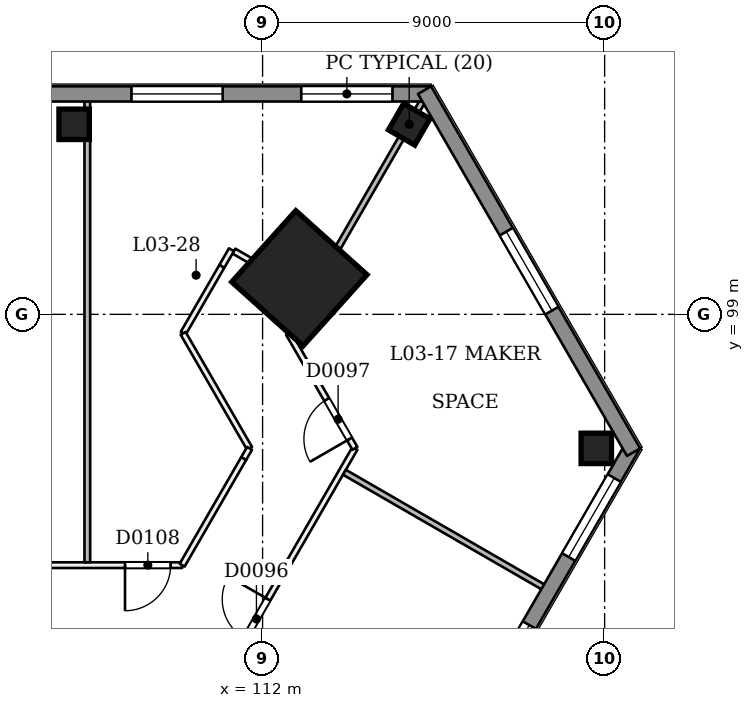
"""IFC4 building model, lengths in metres.
Left out: names, types, materials, properties, quantities, classifications, styles, units other than length and angle.
Written with IfcOpenShell. Run it as: python <this file> out.ifc"""

import sys

from ifc_helpers import new_model, si_unit, direction, frame, frame_2d, origin, origin_2d, place, context, subcontext, project, spatial, rectangle, extrude, element, fill, save


model = new_model("IFC4")
c1 = context("Model", 3, precision=1e-05, world=origin(), true_north=direction((0.0, 1.0)))
c2 = subcontext(c1, "Body", "Model", "MODEL_VIEW")
j1 = project(units=[si_unit("LENGTHUNIT", "METRE"), si_unit("PLANEANGLEUNIT", "RADIAN")], contexts=[c1])
p1 = place(None, origin())
s1 = spatial("IfcSite", under=j1, at=p1, CompositionType="ELEMENT")
p2 = place(p1, origin())
s2 = spatial("IfcBuilding", under=s1, at=p2, CompositionType="ELEMENT")
p3 = place(p2, frame((0.0, 0.0, 18.0)))
s3 = spatial("IfcBuildingStorey", under=s2, at=p3, CompositionType="ELEMENT", Elevation=18.0)
p4 = place(p3, frame((113.003, 99.937, 0.0), z_axis=(-0.028416116488, 0.009273198319, 0.999553166228), x_axis=(0.499378169788, -0.866098833474, 0.022231828423)))
e1 = element("IfcColumn", 1, at=p4, inside=s3, PredefinedType="COLUMN", context=c2, shape_type="SweptSolid", body=[
    extrude(rectangle(XDim=2.52, YDim=2.52, at=origin_2d()), origin(), (0.0, 0.0, 1.0), 4.502),
])
for number, where, z_axis, x_axis in (
    (2, (115.858, 104.0, 0.0), (0.0, 0.0, 1.0), (0.5, 0.866, 0.0)),
    (3, (107.041, 104.0, 0.0), (0.0, 0.0, 1.0), (1.0, 0.0, 0.0)),
    (4, (120.781, 95.474, 0.0), (0.0, 0.0, 1.0), (1.745e-08, 1.0, 0.0)),
):
    element("IfcColumn", number, at=place(p3, frame(where, z_axis=z_axis, x_axis=x_axis)), inside=s3, PredefinedType="COLUMN", context=c2, shape_type="SweptSolid", body=[
        extrude(rectangle(XDim=0.8, YDim=0.8, at=origin_2d()), origin(), (0.0, 0.0, 1.0), 4.5),
    ])
p5 = place(p3, frame((86.747, 47.526, 0.0), z_axis=(0.0, 0.0, 1.0), x_axis=(0.500000085768, 0.866025354266, 0.0)))
e5 = element("IfcWall", 5, at=p5, inside=s3, PredefinedType="PARTITIONING", context=c2, shape_type="SweptSolid", body=[
    extrude(rectangle(XDim=55.365, YDim=0.15, at=frame_2d((27.682, 0.0))), origin(), (0.0, 0.0, 1.0), 3.55),
])
p6 = place(p5, frame((0.97, 0.0, 0.0)))
e6 = element("IfcOpeningElement", 6, at=p6, cuts=e5, PredefinedType="OPENING", context=c2, shape_type="SweptSolid", body=[
    extrude(rectangle(XDim=1.2, YDim=2.1, at=frame_2d((0.6, 1.05))), frame((0.0, 0.085, 0.0), z_axis=(0.0, -1.0, 0.0), x_axis=(1.0, 0.0, 0.0)), (0.0, 0.0, 1.0), 0.171),
])
p7 = place(p5, frame((11.332, 0.0, 0.0)))
e7 = element("IfcOpeningElement", 7, at=p7, cuts=e5, PredefinedType="OPENING", context=c2, shape_type="SweptSolid", body=[
    extrude(rectangle(XDim=1.2, YDim=2.1, at=frame_2d((0.6, 1.05))), frame((0.0, 0.085, 0.0), z_axis=(0.0, -1.0, 0.0), x_axis=(1.0, 0.0, 0.0)), (0.0, 0.0, 1.0), 0.171),
])
p8 = place(p5, frame((22.582, 0.0, 0.0)))
e8 = element("IfcOpeningElement", 8, at=p8, cuts=e5, PredefinedType="OPENING", context=c2, shape_type="SweptSolid", body=[
    extrude(rectangle(XDim=1.2, YDim=2.1, at=frame_2d((0.6, 1.05))), frame((0.0, 0.085, 0.0), z_axis=(0.0, -1.0, 0.0), x_axis=(1.0, 0.0, 0.0)), (0.0, 0.0, 1.0), 0.171),
])
p9 = place(p5, frame((28.365, 0.0, 0.0)))
e9 = element("IfcOpeningElement", 9, at=p9, cuts=e5, PredefinedType="OPENING", context=c2, shape_type="SweptSolid", body=[
    extrude(rectangle(XDim=1.0, YDim=2.1, at=frame_2d((0.5, 1.05))), frame((0.0, 0.085, 0.0), z_axis=(0.0, -1.0, 0.0), x_axis=(1.0, 0.0, 0.0)), (0.0, 0.0, 1.0), 0.171),
])
p10 = place(p5, frame((30.615, 0.0, 0.0)))
e10 = element("IfcOpeningElement", 10, at=p10, cuts=e5, PredefinedType="OPENING", context=c2, shape_type="SweptSolid", body=[
    extrude(rectangle(XDim=1.0, YDim=2.1, at=frame_2d((0.5, 1.05))), frame((0.0, 0.085, 0.0), z_axis=(0.0, -1.0, 0.0), x_axis=(1.0, 0.0, 0.0)), (0.0, 0.0, 1.0), 0.171),
])
p11 = place(p5, frame((38.332, 0.0, 0.0)))
e11 = element("IfcOpeningElement", 11, at=p11, cuts=e5, PredefinedType="OPENING", context=c2, shape_type="SweptSolid", body=[
    extrude(rectangle(XDim=1.2, YDim=2.1, at=frame_2d((0.6, 1.05))), frame((0.0, 0.085, 0.0), z_axis=(0.0, -1.0, 0.0), x_axis=(1.0, 0.0, 0.0)), (0.0, 0.0, 1.0), 0.171),
])
p12 = place(p5, frame((49.582, 0.0, 0.0)))
e12 = element("IfcOpeningElement", 12, at=p12, cuts=e5, PredefinedType="OPENING", context=c2, shape_type="SweptSolid", body=[
    extrude(rectangle(XDim=1.2, YDim=2.1, at=frame_2d((0.6, 1.05))), frame((0.0, 0.085, 0.0), z_axis=(0.0, -1.0, 0.0), x_axis=(1.0, 0.0, 0.0)), (0.0, 0.0, 1.0), 0.171),
])
p13 = place(p3, frame((114.43, 95.474, 0.0), z_axis=(0.0, 0.0, 1.0), x_axis=(-0.500008701212, 0.866020380079, 0.0)))
e13 = element("IfcWall", 13, at=p13, inside=s3, PredefinedType="PARTITIONING", context=c2, shape_type="SweptSolid", body=[
    extrude(rectangle(XDim=3.495, YDim=0.15, at=frame_2d((1.747, 0.0))), origin(), (0.0, 0.0, 1.0), 3.55),
])
p14 = place(p13, frame((0.285, 0.0, 0.0)))
e14 = element("IfcOpeningElement", 14, at=p14, cuts=e13, PredefinedType="OPENING", context=c2, shape_type="SweptSolid", body=[
    extrude(rectangle(XDim=1.2, YDim=2.1, at=frame_2d((0.6, 1.05))), frame((0.0, 0.085, 0.0), z_axis=(0.0, -1.0, 0.0), x_axis=(1.0, 0.0, 0.0)), (0.0, 0.0, 1.0), 0.171),
])
p15 = place(p3, frame((112.682, 98.5, 0.0), z_axis=(0.0, 0.0, 1.0), x_axis=(0.500172206961, 0.865925957218, 0.0)))
e15 = element("IfcWall", 15, at=p15, inside=s3, PredefinedType="PARTITIONING", context=c2, shape_type="SweptSolid", body=[
    extrude(rectangle(XDim=1.081, YDim=0.15, at=frame_2d((0.54, 0.0))), origin(), (0.0, 0.0, 1.0), 3.55),
])
p16 = place(p3, frame((109.883, 92.401, 0.0), z_axis=(0.0, 0.0, 1.0), x_axis=(-1.0, 0.0, 0.0)))
e16 = element("IfcWall", 16, at=p16, inside=s3, PredefinedType="PARTITIONING", context=c2, shape_type="SweptSolid", body=[
    extrude(rectangle(XDim=10.082, YDim=0.15, at=frame_2d((5.041, 0.0))), origin(), (0.0, 0.0, 1.0), 4.05),
])
p17 = place(p16, frame((5.987, 0.0, 0.0)))
e17 = element("IfcOpeningElement", 17, at=p17, cuts=e16, PredefinedType="OPENING", context=c2, shape_type="SweptSolid", body=[
    extrude(rectangle(XDim=1.2, YDim=2.1, at=frame_2d((0.6, 1.05))), frame((0.0, 0.085, 0.0), z_axis=(0.0, -1.0, 0.0), x_axis=(1.0, 0.0, 0.0)), (0.0, 0.0, 1.0), 0.171),
])
p18 = place(p16, frame((0.303, 0.0, 0.0)))
e18 = element("IfcOpeningElement", 18, at=p18, cuts=e16, PredefinedType="OPENING", context=c2, shape_type="SweptSolid", body=[
    extrude(rectangle(XDim=1.2, YDim=2.1, at=frame_2d((0.6, 1.05))), frame((0.0, 0.085, 0.0), z_axis=(0.0, -1.0, 0.0), x_axis=(1.0, 0.0, 0.0)), (0.0, 0.0, 1.0), 0.171),
])
p19 = place(p3, frame((113.195, 99.538, 0.0), z_axis=(0.0, 0.0, 1.0), x_axis=(-0.866200031611, 0.499697413678, 0.0)))
e19 = element("IfcWall", 19, at=p19, inside=s3, PredefinedType="PARTITIONING", context=c2, shape_type="SweptSolid", body=[
    extrude(rectangle(XDim=2.251, YDim=0.15, at=frame_2d((1.125, 0.0))), origin(), (0.0, 0.0, 1.0), 3.55),
])
p20 = place(p3, frame((111.181, 100.701, 0.0), z_axis=(0.0, 0.0, 1.0), x_axis=(-0.499972622635, -0.866041209536, 0.0)))
e20 = element("IfcWall", 20, at=p20, inside=s3, PredefinedType="PARTITIONING", context=c2, shape_type="SweptSolid", body=[
    extrude(rectangle(XDim=0.507, YDim=0.15, at=frame_2d((0.253, 0.0))), origin(), (0.0, 0.0, 1.0), 3.55),
])
p21 = place(p3, frame((110.927, 100.262, 0.0), z_axis=(0.0, 0.0, 1.0), x_axis=(-0.499985639223, -0.866033694824, 0.0)))
e21 = element("IfcWall", 21, at=p21, inside=s3, PredefinedType="PARTITIONING", context=c2, shape_type="SweptSolid", body=[
    extrude(rectangle(XDim=2.034, YDim=0.15, at=frame_2d((1.017, 0.0))), origin(), (0.0, 0.0, 1.0), 4.05),
])
p22 = place(p3, frame((109.91, 98.5, 0.0), z_axis=(0.0, 0.0, 1.0), x_axis=(0.499956301907, -0.86605063142, 0.0)))
e22 = element("IfcWall", 22, at=p22, inside=s3, PredefinedType="PARTITIONING", context=c2, shape_type="SweptSolid", body=[
    extrude(rectangle(XDim=3.494, YDim=0.15, at=frame_2d((1.747, 0.0))), origin(), (0.0, 0.0, 1.0), 3.55),
])
p23 = place(p3, frame((111.657, 95.474, 0.0), z_axis=(0.0, 0.0, 1.0), x_axis=(-0.500016430238, -0.866015917575, 0.0)))
e23 = element("IfcWall", 23, at=p23, inside=s3, PredefinedType="PARTITIONING", context=c2, shape_type="SweptSolid", body=[
    extrude(rectangle(XDim=0.312, YDim=0.15, at=frame_2d((0.156, 0.0))), origin(), (0.0, 0.0, 1.0), 3.55),
])
p24 = place(p3, frame((111.501, 95.204, 0.0), z_axis=(0.0, 0.0, 1.0), x_axis=(-0.499968406128, -0.866043643747, 0.0)))
e24 = element("IfcWall", 24, at=p24, inside=s3, PredefinedType="PARTITIONING", context=c2, shape_type="SweptSolid", body=[
    extrude(rectangle(XDim=3.237, YDim=0.15, at=frame_2d((1.618, 0.0))), origin(), (0.0, 0.0, 1.0), 4.05),
])
p25 = place(p3, frame((119.631, 91.683, 0.0), z_axis=(0.0, 0.0, 1.0), x_axis=(-0.866025537322, 0.499999768706, 0.0)))
e25 = element("IfcWall", 25, at=p25, inside=s3, PredefinedType="PARTITIONING", context=c2, shape_type="SweptSolid", body=[
    extrude(rectangle(XDim=6.325, YDim=0.15, at=frame_2d((3.163, 0.0))), origin(), (0.0, 0.0, 1.0), 4.05),
])
p26 = place(p3, frame((116.377, 104.9, 0.0), z_axis=(0.0, 0.0, 1.0), x_axis=(-0.500013984911, -0.866017329442, 0.0)))
e26 = element("IfcWall", 26, at=p26, inside=s3, PredefinedType="PARTITIONING", context=c2, shape_type="SweptSolid", body=[
    extrude(rectangle(XDim=6.234, YDim=0.15, at=frame_2d((3.117, 0.0))), origin(), (0.0, 0.0, 1.0), 4.05),
])
p27 = place(p3, frame((107.388, 92.476, 0.0), z_axis=(0.0, 0.0, 1.0), x_axis=(0.0, 1.0, 0.0)))
e27 = element("IfcWall", 27, at=p27, inside=s3, PredefinedType="PARTITIONING", context=c2, shape_type="SweptSolid", body=[
    extrude(rectangle(XDim=12.424, YDim=0.15, at=frame_2d((6.212, 0.0))), origin(), (0.0, 0.0, 1.0), 3.55),
])
p28 = place(p3, frame((53.565, 104.8, 0.0), z_axis=(0.0, 0.0, 1.0), x_axis=(1.0, 0.0, 0.0)))
e28 = element("IfcWall", 28, at=p28, inside=s3, PredefinedType="SOLIDWALL", context=c2, shape_type="SweptSolid", body=[
    extrude(rectangle(XDim=62.871, YDim=0.4, at=frame_2d((31.435, 0.0))), origin(), (0.0, 0.0, 1.0), 3.55),
])
p29 = place(p28, frame((59.452, 0.0, 0.9)))
e29 = element("IfcOpeningElement", 29, at=p29, cuts=e28, PredefinedType="OPENING", context=c2, shape_type="SweptSolid", body=[
    extrude(rectangle(XDim=2.4, YDim=1.5, at=frame_2d((1.2, 0.75))), frame((0.0, 0.21, 0.0), z_axis=(0.0, -1.0, 0.0), x_axis=(1.0, 0.0, 0.0)), (0.0, 0.0, 1.0), 0.421),
])
p30 = place(p28, frame((54.986, 0.0, 0.9)))
e30 = element("IfcOpeningElement", 30, at=p30, cuts=e28, PredefinedType="OPENING", context=c2, shape_type="SweptSolid", body=[
    extrude(rectangle(XDim=2.4, YDim=1.5, at=frame_2d((1.2, 0.75))), frame((0.0, 0.21, 0.0), z_axis=(0.0, -1.0, 0.0), x_axis=(1.0, 0.0, 0.0)), (0.0, 0.0, 1.0), 0.421),
])
p31 = place(p28, frame((45.986, 0.0, 0.9)))
e31 = element("IfcOpeningElement", 31, at=p31, cuts=e28, PredefinedType="OPENING", context=c2, shape_type="SweptSolid", body=[
    extrude(rectangle(XDim=2.4, YDim=1.5, at=frame_2d((1.2, 0.75))), frame((0.0, 0.21, 0.0), z_axis=(0.0, -1.0, 0.0), x_axis=(1.0, 0.0, 0.0)), (0.0, 0.0, 1.0), 0.421),
])
p32 = place(p28, frame((14.486, 0.0, 0.9)))
e32 = element("IfcOpeningElement", 32, at=p32, cuts=e28, PredefinedType="OPENING", context=c2, shape_type="SweptSolid", body=[
    extrude(rectangle(XDim=2.4, YDim=1.5, at=frame_2d((1.2, 0.75))), frame((0.0, 0.21, 0.0), z_axis=(0.0, -1.0, 0.0), x_axis=(1.0, 0.0, 0.0)), (0.0, 0.0, 1.0), 0.421),
])
p33 = place(p28, frame((1.018, 0.0, 0.9)))
e33 = element("IfcOpeningElement", 33, at=p33, cuts=e28, PredefinedType="OPENING", context=c2, shape_type="SweptSolid", body=[
    extrude(rectangle(XDim=2.4, YDim=1.5, at=frame_2d((1.2, 0.75))), frame((0.0, 0.21, 0.0), z_axis=(0.0, -1.0, 0.0), x_axis=(1.0, 0.0, 0.0)), (0.0, 0.0, 1.0), 0.421),
])
p34 = place(p3, frame((121.762, 95.574, 0.0), z_axis=(0.0, 0.0, 1.0), x_axis=(-0.499997306052, -0.866026959131, 0.0)))
e34 = element("IfcWall", 34, at=p34, inside=s3, PredefinedType="SOLIDWALL", context=c2, shape_type="SweptSolid", body=[
    extrude(rectangle(XDim=62.87, YDim=0.4, at=frame_2d((31.435, 0.0))), origin(), (0.0, 0.0, 1.0), 3.55),
])
p35 = place(p34, frame((59.452, 0.0, 0.9)))
e35 = element("IfcOpeningElement", 35, at=p35, cuts=e34, PredefinedType="OPENING", context=c2, shape_type="SweptSolid", body=[
    extrude(rectangle(XDim=2.4, YDim=1.5, at=frame_2d((1.2, 0.75))), frame((0.0, 0.21, 0.0), z_axis=(0.0, -1.0, 0.0), x_axis=(1.0, 0.0, 0.0)), (0.0, 0.0, 1.0), 0.421),
])
p36 = place(p34, frame((54.986, 0.0, 0.9)))
e36 = element("IfcOpeningElement", 36, at=p36, cuts=e34, PredefinedType="OPENING", context=c2, shape_type="SweptSolid", body=[
    extrude(rectangle(XDim=2.4, YDim=1.5, at=frame_2d((1.2, 0.75))), frame((0.0, 0.21, 0.0), z_axis=(0.0, -1.0, 0.0), x_axis=(1.0, 0.0, 0.0)), (0.0, 0.0, 1.0), 0.421),
])
p37 = place(p34, frame((50.486, 0.0, 0.9)))
e37 = element("IfcOpeningElement", 37, at=p37, cuts=e34, PredefinedType="OPENING", context=c2, shape_type="SweptSolid", body=[
    extrude(rectangle(XDim=2.4, YDim=1.5, at=frame_2d((1.2, 0.75))), frame((0.0, 0.21, 0.0), z_axis=(0.0, -1.0, 0.0), x_axis=(1.0, 0.0, 0.0)), (0.0, 0.0, 1.0), 0.421),
])
p38 = place(p34, frame((45.986, 0.0, 0.9)))
e38 = element("IfcOpeningElement", 38, at=p38, cuts=e34, PredefinedType="OPENING", context=c2, shape_type="SweptSolid", body=[
    extrude(rectangle(XDim=2.4, YDim=1.5, at=frame_2d((1.2, 0.75))), frame((0.0, 0.21, 0.0), z_axis=(0.0, -1.0, 0.0), x_axis=(1.0, 0.0, 0.0)), (0.0, 0.0, 1.0), 0.421),
])
p39 = place(p34, frame((41.486, 0.0, 0.9)))
e39 = element("IfcOpeningElement", 39, at=p39, cuts=e34, PredefinedType="OPENING", context=c2, shape_type="SweptSolid", body=[
    extrude(rectangle(XDim=2.4, YDim=1.5, at=frame_2d((1.2, 0.75))), frame((0.0, 0.21, 0.0), z_axis=(0.0, -1.0, 0.0), x_axis=(1.0, 0.0, 0.0)), (0.0, 0.0, 1.0), 0.421),
])
p40 = place(p34, frame((36.986, 0.0, 0.9)))
e40 = element("IfcOpeningElement", 40, at=p40, cuts=e34, PredefinedType="OPENING", context=c2, shape_type="SweptSolid", body=[
    extrude(rectangle(XDim=2.4, YDim=1.5, at=frame_2d((1.2, 0.75))), frame((0.0, 0.21, 0.0), z_axis=(0.0, -1.0, 0.0), x_axis=(1.0, 0.0, 0.0)), (0.0, 0.0, 1.0), 0.421),
])
p41 = place(p34, frame((23.486, 0.0, 0.9)))
e41 = element("IfcOpeningElement", 41, at=p41, cuts=e34, PredefinedType="OPENING", context=c2, shape_type="SweptSolid", body=[
    extrude(rectangle(XDim=2.4, YDim=1.5, at=frame_2d((1.2, 0.75))), frame((0.0, 0.21, 0.0), z_axis=(0.0, -1.0, 0.0), x_axis=(1.0, 0.0, 0.0)), (0.0, 0.0, 1.0), 0.421),
])
p42 = place(p34, frame((18.986, 0.0, 0.9)))
e42 = element("IfcOpeningElement", 42, at=p42, cuts=e34, PredefinedType="OPENING", context=c2, shape_type="SweptSolid", body=[
    extrude(rectangle(XDim=2.4, YDim=1.5, at=frame_2d((1.2, 0.75))), frame((0.0, 0.21, 0.0), z_axis=(0.0, -1.0, 0.0), x_axis=(1.0, 0.0, 0.0)), (0.0, 0.0, 1.0), 0.421),
])
p43 = place(p34, frame((14.486, 0.0, 0.9)))
e43 = element("IfcOpeningElement", 43, at=p43, cuts=e34, PredefinedType="OPENING", context=c2, shape_type="SweptSolid", body=[
    extrude(rectangle(XDim=2.4, YDim=1.5, at=frame_2d((1.2, 0.75))), frame((0.0, 0.21, 0.0), z_axis=(0.0, -1.0, 0.0), x_axis=(1.0, 0.0, 0.0)), (0.0, 0.0, 1.0), 0.421),
])
p44 = place(p34, frame((5.486, 0.0, 0.9)))
e44 = element("IfcOpeningElement", 44, at=p44, cuts=e34, PredefinedType="OPENING", context=c2, shape_type="SweptSolid", body=[
    extrude(rectangle(XDim=2.4, YDim=1.5, at=frame_2d((1.2, 0.75))), frame((0.0, 0.21, 0.0), z_axis=(0.0, -1.0, 0.0), x_axis=(1.0, 0.0, 0.0)), (0.0, 0.0, 1.0), 0.421),
])
p45 = place(p34, frame((1.018, 0.0, 0.9)))
e45 = element("IfcOpeningElement", 45, at=p45, cuts=e34, PredefinedType="OPENING", context=c2, shape_type="SweptSolid", body=[
    extrude(rectangle(XDim=2.4, YDim=1.5, at=frame_2d((1.2, 0.75))), frame((0.0, 0.21, 0.0), z_axis=(0.0, -1.0, 0.0), x_axis=(1.0, 0.0, 0.0)), (0.0, 0.0, 1.0), 0.421),
])
p46 = place(p3, frame((116.262, 104.9, 0.0), z_axis=(0.0, 0.0, 1.0), x_axis=(0.50000615651, -0.866021849293, 0.0)))
e46 = element("IfcWall", 46, at=p46, inside=s3, PredefinedType="SOLIDWALL", context=c2, shape_type="SweptSolid", body=[
    extrude(rectangle(XDim=11.0, YDim=0.4, at=frame_2d((5.5, 0.0))), origin(), (0.0, 0.0, 1.0), 3.55),
])
p47 = place(p46, frame((4.3, 0.0, 0.9)))
e47 = element("IfcOpeningElement", 47, at=p47, cuts=e46, PredefinedType="OPENING", context=c2, shape_type="SweptSolid", body=[
    extrude(rectangle(XDim=2.4, YDim=1.5, at=frame_2d((1.2, 0.75))), frame((0.0, 0.21, 0.0), z_axis=(0.0, -1.0, 0.0), x_axis=(1.0, 0.0, 0.0)), (0.0, 0.0, 1.0), 0.421),
])
p48 = place(p12, origin())
e48 = element("IfcDoor", 48, at=p48, inside=s3, OperationType="SINGLE_SWING_RIGHT", PredefinedType="NOTDEFINED", context=c2, shape_type="SweptSolid", body=[
    extrude(rectangle(XDim=1.2, YDim=2.1, at=frame_2d((0.6, 1.05))), frame((0.0, 0.025, 0.0), z_axis=(0.0, -1.0, 0.0), x_axis=(1.0, 0.0, 0.0)), (0.0, 0.0, 1.0), 0.05),
])
fill(e12, e48)
p49 = place(p14, origin())
e49 = element("IfcDoor", 49, at=p49, inside=s3, OperationType="SINGLE_SWING_LEFT", PredefinedType="NOTDEFINED", context=c2, shape_type="SweptSolid", body=[
    extrude(rectangle(XDim=1.2, YDim=2.1, at=frame_2d((0.6, 1.05))), frame((0.0, 0.025, 0.0), z_axis=(0.0, -1.0, 0.0), x_axis=(1.0, 0.0, 0.0)), (0.0, 0.0, 1.0), 0.05),
])
fill(e14, e49)
p50 = place(p18, origin())
e50 = element("IfcDoor", 50, at=p50, inside=s3, OperationType="SINGLE_SWING_RIGHT", PredefinedType="NOTDEFINED", context=c2, shape_type="SweptSolid", body=[
    extrude(rectangle(XDim=1.2, YDim=2.1, at=frame_2d((0.6, 1.05))), frame((0.0, 0.025, 0.0), z_axis=(0.0, -1.0, 0.0), x_axis=(1.0, 0.0, 0.0)), (0.0, 0.0, 1.0), 0.05),
])
fill(e18, e50)
p51 = place(p29, origin())
e51 = element("IfcWindow", 51, at=p51, inside=s3, PartitioningType="SINGLE_PANEL", PredefinedType="WINDOW", context=c2, shape_type="SweptSolid", body=[
    extrude(rectangle(XDim=2.4, YDim=1.5, at=frame_2d((1.2, 0.75))), frame((0.0, 0.03, 0.0), z_axis=(0.0, -1.0, 0.0), x_axis=(1.0, 0.0, 0.0)), (0.0, 0.0, 1.0), 0.06),
])
fill(e29, e51)
p52 = place(p30, origin())
e52 = element("IfcWindow", 52, at=p52, inside=s3, PartitioningType="SINGLE_PANEL", PredefinedType="WINDOW", context=c2, shape_type="SweptSolid", body=[
    extrude(rectangle(XDim=2.4, YDim=1.5, at=frame_2d((1.2, 0.75))), frame((0.0, 0.03, 0.0), z_axis=(0.0, -1.0, 0.0), x_axis=(1.0, 0.0, 0.0)), (0.0, 0.0, 1.0), 0.06),
])
fill(e30, e52)
p53 = place(p44, origin())
e53 = element("IfcWindow", 53, at=p53, inside=s3, PartitioningType="SINGLE_PANEL", PredefinedType="WINDOW", context=c2, shape_type="SweptSolid", body=[
    extrude(rectangle(XDim=2.4, YDim=1.5, at=frame_2d((1.2, 0.75))), frame((0.0, 0.03, 0.0), z_axis=(0.0, -1.0, 0.0), x_axis=(1.0, 0.0, 0.0)), (0.0, 0.0, 1.0), 0.06),
])
fill(e44, e53)
p54 = place(p45, origin())
e54 = element("IfcWindow", 54, at=p54, inside=s3, PartitioningType="SINGLE_PANEL", PredefinedType="WINDOW", context=c2, shape_type="SweptSolid", body=[
    extrude(rectangle(XDim=2.4, YDim=1.5, at=frame_2d((1.2, 0.75))), frame((0.0, 0.03, 0.0), z_axis=(0.0, -1.0, 0.0), x_axis=(1.0, 0.0, 0.0)), (0.0, 0.0, 1.0), 0.06),
])
fill(e45, e54)
p55 = place(p47, origin())
e55 = element("IfcWindow", 55, at=p55, inside=s3, PartitioningType="SINGLE_PANEL", PredefinedType="WINDOW", context=c2, shape_type="SweptSolid", body=[
    extrude(rectangle(XDim=2.4, YDim=1.5, at=frame_2d((1.2, 0.75))), frame((0.0, 0.03, 0.0), z_axis=(0.0, -1.0, 0.0), x_axis=(1.0, 0.0, 0.0)), (0.0, 0.0, 1.0), 0.06),
])
fill(e47, e55)
save(model, sys.argv[1])
